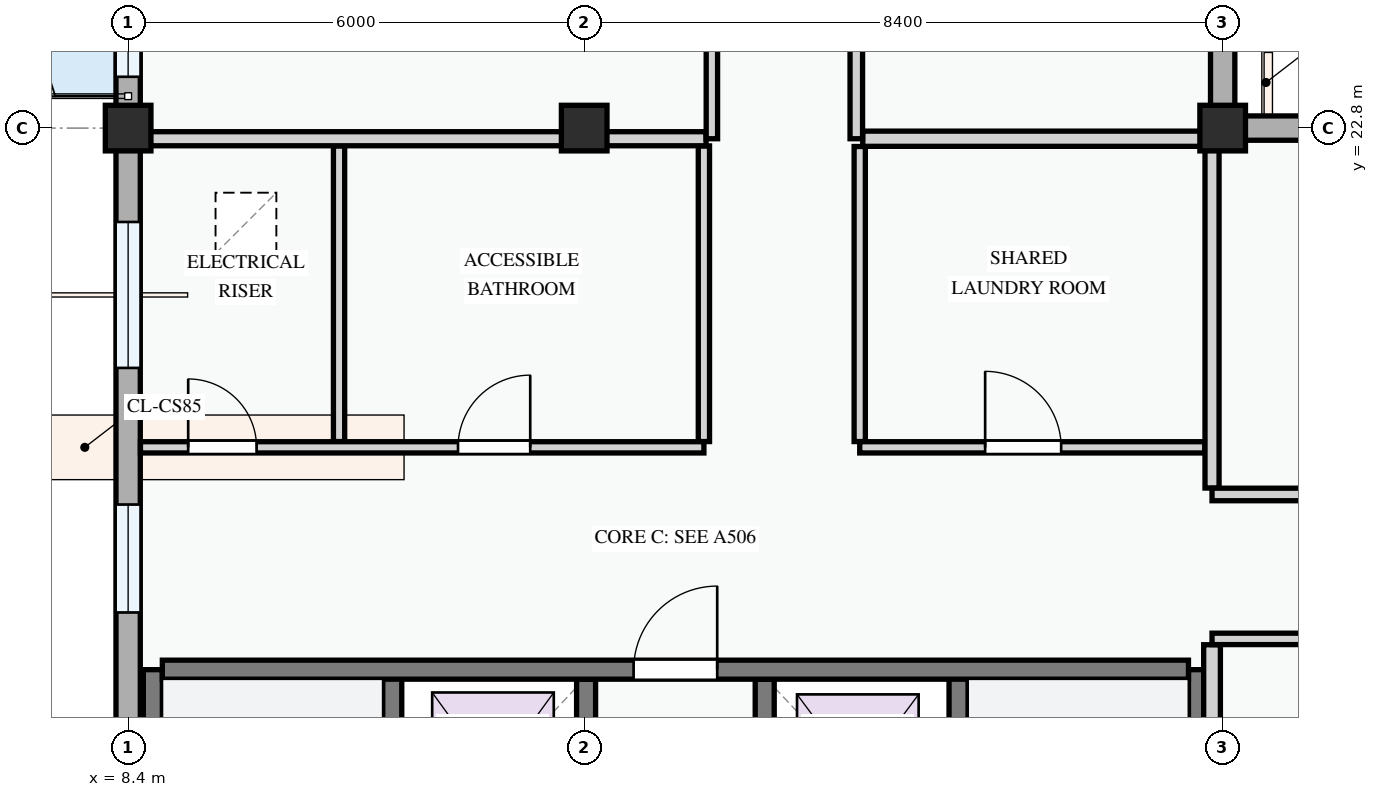
"""IFC4 building model, lengths in metres.
Left out: names, types, materials, properties, quantities, classifications, styles, units other than length and angle.
Written with IfcOpenShell. Run it as: python <this file> out.ifc"""

import sys

from ifc_helpers import new_model, si_unit, direction, frame, frame_2d, origin, origin_2d, place, context, subcontext, project, spatial, rectangle, extrude, element, fill, save


model = new_model("IFC4")
c1 = context("Model", 3, precision=1e-05, world=origin(), true_north=direction((0.0, 1.0)))
c2 = subcontext(c1, "Body", "Model", "MODEL_VIEW")
j1 = project(units=[si_unit("LENGTHUNIT", "METRE"), si_unit("PLANEANGLEUNIT", "RADIAN")], contexts=[c1])
p1 = place(None, origin())
s1 = spatial("IfcSite", under=j1, at=p1, CompositionType="ELEMENT")
p2 = place(p1, origin())
s2 = spatial("IfcBuilding", under=s1, at=p2, CompositionType="ELEMENT")
p3 = place(p2, frame((0.0, 0.0, 14.7)))
s3 = spatial("IfcBuildingStorey", under=s2, at=p3, CompositionType="ELEMENT", Elevation=14.7)
for number, where, z_axis, x_axis in (
    (1, (8.4, 22.8, 0.0), (0.0, 0.0, 1.0), (1.0, 0.0, 0.0)),
    (2, (14.4, 22.8, 0.0), (0.0, 0.0, 1.0), (1.0, 0.0, 0.0)),
    (3, (22.8, 22.8, 0.0), (0.0, 0.0, 1.0), (1.0, 0.0, 0.0)),
):
    element("IfcColumn", number, at=place(p3, frame(where, z_axis=z_axis, x_axis=x_axis)), inside=s3, PredefinedType="COLUMN", context=c2, shape_type="SweptSolid", body=[
        extrude(rectangle(XDim=0.6, YDim=0.6, at=origin_2d()), origin(), (0.0, 0.0, 1.0), 3.3),
    ])
p4 = place(p3, frame((22.8, 22.8, 0.0), z_axis=(0.0, 0.0, 1.0), x_axis=(0.0, 1.0, 0.0)))
e4 = element("IfcWall", 4, at=p4, inside=s3, PredefinedType="STANDARD", context=c2, shape_type="SweptSolid", body=[
    extrude(rectangle(XDim=6.0, YDim=0.32, at=frame_2d((3.0, 0.0))), origin(), (0.0, 0.0, 1.0), 2.575),
])
p5 = place(p4, frame((1.56, 0.0, 0.78)))
e5 = element("IfcOpeningElement", 5, at=p5, cuts=e4, PredefinedType="OPENING", context=c2, shape_type="SweptSolid", body=[
    extrude(rectangle(XDim=1.25, YDim=1.45, at=frame_2d((0.625, 0.725))), frame((0.0, 0.17, 0.0), z_axis=(0.0, -1.0, 0.0), x_axis=(1.0, 0.0, 0.0)), (0.0, 0.0, 1.0), 0.34),
])
p6 = place(p4, frame((4.521, 0.0, 0.78)))
e6 = element("IfcOpeningElement", 6, at=p6, cuts=e4, PredefinedType="OPENING", context=c2, shape_type="SweptSolid", body=[
    extrude(rectangle(XDim=0.95, YDim=1.15, at=frame_2d((0.475, 0.575))), frame((0.0, 0.17, 0.0), z_axis=(0.0, -1.0, 0.0), x_axis=(1.0, 0.0, 0.0)), (0.0, 0.0, 1.0), 0.34),
])
p7 = place(p3, frame((8.4, 28.8, 0.0), z_axis=(0.0, 0.0, 1.0), x_axis=(0.0, -1.0, 0.0)))
e7 = element("IfcWall", 7, at=p7, inside=s3, PredefinedType="STANDARD", context=c2, shape_type="SweptSolid", body=[
    extrude(rectangle(XDim=6.0, YDim=0.32, at=frame_2d((3.0, 0.0))), origin(), (0.0, 0.0, 1.0), 2.445),
])
p8 = place(p7, frame((2.14, 0.0, 0.0)))
e8 = element("IfcOpeningElement", 8, at=p8, cuts=e7, PredefinedType="OPENING", context=c2, shape_type="SweptSolid", body=[
    extrude(rectangle(XDim=1.4, YDim=2.2, at=frame_2d((0.7, 1.1))), frame((0.0, 0.17, 0.0), z_axis=(0.0, -1.0, 0.0), x_axis=(1.0, 0.0, 0.0)), (0.0, 0.0, 1.0), 0.34),
])
p9 = place(p7, frame((0.475, 0.0, 0.78)))
e9 = element("IfcOpeningElement", 9, at=p9, cuts=e7, PredefinedType="OPENING", context=c2, shape_type="SweptSolid", body=[
    extrude(rectangle(XDim=1.05, YDim=1.2, at=frame_2d((0.525, 0.6))), frame((0.0, 0.17, 0.0), z_axis=(0.0, -1.0, 0.0), x_axis=(1.0, 0.0, 0.0)), (0.0, 0.0, 1.0), 0.34),
])
p10 = place(p7, frame((4.075, 0.0, 0.78)))
e10 = element("IfcOpeningElement", 10, at=p10, cuts=e7, PredefinedType="OPENING", context=c2, shape_type="SweptSolid", body=[
    extrude(rectangle(XDim=1.25, YDim=1.3, at=frame_2d((0.625, 0.65))), frame((0.0, 0.17, 0.0), z_axis=(0.0, -1.0, 0.0), x_axis=(1.0, 0.0, 0.0)), (0.0, 0.0, 1.0), 0.34),
])
p11 = place(p3, frame((8.4, 22.8, 0.0), z_axis=(0.0, 0.0, 1.0), x_axis=(0.0, -1.0, 0.0)))
e11 = element("IfcWall", 11, at=p11, inside=s3, PredefinedType="STANDARD", context=c2, shape_type="SweptSolid", body=[
    extrude(rectangle(XDim=8.4, YDim=0.32, at=frame_2d((4.2, 0.0))), origin(), (0.0, 0.0, 1.0), 2.345),
])
p12 = place(p11, frame((1.235, 0.0, 0.78)))
e12 = element("IfcOpeningElement", 12, at=p12, cuts=e11, PredefinedType="OPENING", context=c2, shape_type="SweptSolid", body=[
    extrude(rectangle(XDim=1.92, YDim=1.44, at=frame_2d((0.96, 0.72))), frame((0.0, 0.17, 0.0), z_axis=(0.0, -1.0, 0.0), x_axis=(1.0, 0.0, 0.0)), (0.0, 0.0, 1.0), 0.34),
])
p13 = place(p11, frame((4.952, 0.0, 0.78)))
e13 = element("IfcOpeningElement", 13, at=p13, cuts=e11, PredefinedType="OPENING", context=c2, shape_type="SweptSolid", body=[
    extrude(rectangle(XDim=1.42, YDim=1.38, at=frame_2d((0.71, 0.69))), frame((0.0, 0.17, 0.0), z_axis=(0.0, -1.0, 0.0), x_axis=(1.0, 0.0, 0.0)), (0.0, 0.0, 1.0), 0.34),
])
p14 = place(p3, frame((28.8, 22.8, 0.0), z_axis=(0.0, 0.0, 1.0), x_axis=(-1.0, 0.0, 0.0)))
e14 = element("IfcWall", 14, at=p14, inside=s3, PredefinedType="STANDARD", context=c2, shape_type="SweptSolid", body=[
    extrude(rectangle(XDim=6.0, YDim=0.32, at=frame_2d((3.0, 0.0))), origin(), (0.0, 0.0, 1.0), 2.475),
])
p15 = place(p14, frame((0.555, 0.0, 0.78)))
e15 = element("IfcOpeningElement", 15, at=p15, cuts=e14, PredefinedType="OPENING", context=c2, shape_type="SweptSolid", body=[
    extrude(rectangle(XDim=0.9, YDim=1.2, at=frame_2d((0.45, 0.6))), frame((0.0, 0.17, 0.0), z_axis=(0.0, -1.0, 0.0), x_axis=(1.0, 0.0, 0.0)), (0.0, 0.0, 1.0), 0.34),
])
p16 = place(p14, frame((2.815, 0.0, 0.78)))
e16 = element("IfcOpeningElement", 16, at=p16, cuts=e14, PredefinedType="OPENING", context=c2, shape_type="SweptSolid", body=[
    extrude(rectangle(XDim=2.0, YDim=1.5, at=frame_2d((1.0, 0.75))), frame((0.0, 0.17, 0.0), z_axis=(0.0, -1.0, 0.0), x_axis=(1.0, 0.0, 0.0)), (0.0, 0.0, 1.0), 0.34),
])
p17 = place(p3, frame((11.875, 8.75, 0.0), z_axis=(0.0, 0.0, 1.0), x_axis=(0.0, 1.0, 0.0)))
e17 = element("IfcWall", 17, at=p17, inside=s3, PredefinedType="SHEAR", context=c2, shape_type="SweptSolid", body=[
    extrude(rectangle(XDim=6.925, YDim=0.25, at=frame_2d((3.462, 0.0))), origin(), (0.0, 0.0, 1.0), 3.0),
])
p18 = place(p17, frame((0.35, 0.0, 0.0)))
e18 = element("IfcOpeningElement", 18, at=p18, cuts=e17, PredefinedType="OPENING", context=c2, shape_type="SweptSolid", body=[
    extrude(rectangle(XDim=0.95, YDim=2.1, at=frame_2d((0.475, 1.05))), frame((0.0, 0.135, 0.0), z_axis=(0.0, -1.0, 0.0), x_axis=(1.0, 0.0, 0.0)), (0.0, 0.0, 1.0), 0.27),
])
p19 = place(p3, frame((8.725, 8.6, 0.0), z_axis=(0.0, 0.0, 1.0), x_axis=(0.0, 1.0, 0.0)))
e19 = element("IfcWall", 19, at=p19, inside=s3, PredefinedType="SHEAR", context=c2, shape_type="SweptSolid", body=[
    extrude(rectangle(XDim=7.075, YDim=0.25, at=frame_2d((3.538, 0.0))), origin(), (0.0, 0.0, 1.0), 3.0),
])
p20 = place(p3, frame((22.475, 8.75, 0.0), z_axis=(0.0, 0.0, 1.0), x_axis=(0.0, 1.0, 0.0)))
e20 = element("IfcWall", 20, at=p20, inside=s3, PredefinedType="SHEAR", context=c2, shape_type="SweptSolid", body=[
    extrude(rectangle(XDim=6.925, YDim=0.25, at=frame_2d((3.462, 0.0))), origin(), (0.0, 0.0, 1.0), 3.0),
])
p21 = place(p3, frame((19.325, 8.75, 0.0), z_axis=(0.0, 0.0, 1.0), x_axis=(0.0, 1.0, 0.0)))
e21 = element("IfcWall", 21, at=p21, inside=s3, PredefinedType="SHEAR", context=c2, shape_type="SweptSolid", body=[
    extrude(rectangle(XDim=6.925, YDim=0.25, at=frame_2d((3.462, 0.0))), origin(), (0.0, 0.0, 1.0), 3.0),
])
p22 = place(p21, frame((0.35, 0.0, 0.0)))
e22 = element("IfcOpeningElement", 22, at=p22, cuts=e21, PredefinedType="OPENING", context=c2, shape_type="SweptSolid", body=[
    extrude(rectangle(XDim=0.95, YDim=2.1, at=frame_2d((0.475, 1.05))), frame((0.0, 0.135, 0.0), z_axis=(0.0, -1.0, 0.0), x_axis=(1.0, 0.0, 0.0)), (0.0, 0.0, 1.0), 0.27),
])
for number, where, z_axis, x_axis in (
    (23, (14.425, 13.125, 0.0), (0.0, 0.0, 1.0), (0.0, 1.0, 0.0)),
    (24, (16.775, 13.125, 0.0), (0.0, 0.0, 1.0), (0.0, 1.0, 0.0)),
):
    element("IfcWall", number, at=place(p3, frame(where, z_axis=z_axis, x_axis=x_axis)), inside=s3, PredefinedType="SHEAR", context=c2, shape_type="SweptSolid", body=[
        extrude(rectangle(XDim=2.425, YDim=0.25, at=frame_2d((1.212, 0.0))), origin(), (0.0, 0.0, 1.0), 3.0),
    ])
p23 = place(p3, frame((8.85, 15.675, 0.0), z_axis=(0.0, 0.0, 1.0), x_axis=(1.0, 0.0, 0.0)))
e25 = element("IfcWall", 25, at=p23, inside=s3, PredefinedType="SHEAR", context=c2, shape_type="SweptSolid", body=[
    extrude(rectangle(XDim=13.5, YDim=0.25, at=frame_2d((6.75, 0.0))), origin(), (0.0, 0.0, 1.0), 3.0),
])
p24 = place(p23, frame((6.2, 0.0, 0.0)))
e26 = element("IfcOpeningElement", 26, at=p24, cuts=e25, PredefinedType="OPENING", context=c2, shape_type="SweptSolid", body=[
    extrude(rectangle(XDim=1.1, YDim=2.15, at=frame_2d((0.55, 1.075))), frame((0.0, 0.135, 0.0), z_axis=(0.0, -1.0, 0.0), x_axis=(1.0, 0.0, 0.0)), (0.0, 0.0, 1.0), 0.27),
])
for number, where, z_axis, x_axis in (
    (27, (11.175, 18.676, 0.0), (0.0, 0.0, 1.0), (0.0, 1.0, 0.0)),
    (28, (15.975, 18.676, 0.0), (0.0, 0.0, 1.0), (0.0, 1.0, 0.0)),
):
    element("IfcWall", number, at=place(p3, frame(where, z_axis=z_axis, x_axis=x_axis)), inside=s3, PredefinedType="PARTITIONING", context=c2, shape_type="SweptSolid", body=[
        extrude(rectangle(XDim=3.889, YDim=0.148, at=frame_2d((1.945, 0.0))), origin(), (0.0, 0.0, 1.0), 3.0),
    ])
p25 = place(p3, frame((18.025, 18.676, 0.0), z_axis=(0.0, 0.0, 1.0), x_axis=(0.0, 1.0, 0.0)))
e29 = element("IfcWall", 29, at=p25, inside=s3, PredefinedType="PARTITIONING", context=c2, shape_type="SweptSolid", body=[
    extrude(rectangle(XDim=3.882, YDim=0.148, at=frame_2d((1.941, 0.0))), origin(), (0.0, 0.0, 1.0), 3.0),
])
p26 = place(p3, frame((8.562, 18.6, 0.0), z_axis=(0.0, 0.0, 1.0), x_axis=(1.0, 0.0, 0.0)))
e30 = element("IfcWall", 30, at=p26, inside=s3, PredefinedType="PARTITIONING", context=c2, shape_type="SweptSolid", body=[
    extrude(rectangle(XDim=7.413, YDim=0.148, at=frame_2d((3.707, 0.0))), origin(), (0.0, 0.0, 1.0), 3.0),
])
p27 = place(p26, frame((0.628, 0.0, 0.0)))
e31 = element("IfcOpeningElement", 31, at=p27, cuts=e30, PredefinedType="OPENING", context=c2, shape_type="SweptSolid", body=[
    extrude(rectangle(XDim=0.9, YDim=2.1, at=frame_2d((0.45, 1.05))), frame((0.0, 0.084, 0.0), z_axis=(0.0, -1.0, 0.0), x_axis=(1.0, 0.0, 0.0)), (0.0, 0.0, 1.0), 0.168),
])
p28 = place(p26, frame((4.178, 0.0, 0.0)))
e32 = element("IfcOpeningElement", 32, at=p28, cuts=e30, PredefinedType="OPENING", context=c2, shape_type="SweptSolid", body=[
    extrude(rectangle(XDim=0.95, YDim=2.1, at=frame_2d((0.475, 1.05))), frame((0.0, 0.084, 0.0), z_axis=(0.0, -1.0, 0.0), x_axis=(1.0, 0.0, 0.0)), (0.0, 0.0, 1.0), 0.168),
])
p29 = place(p3, frame((18.025, 18.6, 0.0), z_axis=(0.0, 0.0, 1.0), x_axis=(1.0, 0.0, 0.0)))
e33 = element("IfcWall", 33, at=p29, inside=s3, PredefinedType="PARTITIONING", context=c2, shape_type="SweptSolid", body=[
    extrude(rectangle(XDim=4.541, YDim=0.148, at=frame_2d((2.27, 0.0))), origin(), (0.0, 0.0, 1.0), 3.0),
])
p30 = place(p29, frame((1.65, 0.0, 0.0)))
e34 = element("IfcOpeningElement", 34, at=p30, cuts=e33, PredefinedType="OPENING", context=c2, shape_type="SweptSolid", body=[
    extrude(rectangle(XDim=1.0, YDim=2.15, at=frame_2d((0.5, 1.075))), frame((0.0, 0.084, 0.0), z_axis=(0.0, -1.0, 0.0), x_axis=(1.0, 0.0, 0.0)), (0.0, 0.0, 1.0), 0.168),
])
p31 = place(p3, frame((8.562, 22.66, 0.0), z_axis=(0.0, 0.0, 1.0), x_axis=(1.0, 0.0, 0.0)))
e35 = element("IfcWall", 35, at=p31, inside=s3, PredefinedType="PARTITIONING", context=c2, shape_type="SweptSolid", body=[
    extrude(rectangle(XDim=7.441, YDim=0.185, at=frame_2d((3.72, 0.0))), origin(), (0.0, 0.0, 1.0), 2.375),
])
p32 = place(p3, frame((18.064, 22.66, 0.0), z_axis=(0.0, 0.0, 1.0), x_axis=(1.0, 0.0, 0.0)))
e36 = element("IfcWall", 36, at=p32, inside=s3, PredefinedType="PARTITIONING", context=c2, shape_type="SweptSolid", body=[
    extrude(rectangle(XDim=4.501, YDim=0.2, at=frame_2d((2.25, 0.0))), origin(), (0.0, 0.0, 1.0), 2.375),
])
p33 = place(p3, frame((16.08, 22.66, 0.0), z_axis=(0.0, 0.0, 1.0), x_axis=(0.0, 1.0, 0.0)))
e37 = element("IfcWall", 37, at=p33, inside=s3, PredefinedType="PARTITIONING", context=c2, shape_type="SweptSolid", body=[
    extrude(rectangle(XDim=34.778, YDim=0.15, at=frame_2d((17.389, 0.0))), origin(), (0.0, 0.0, 1.0), 3.0),
])
p34 = place(p33, frame((2.672, 0.0, 0.0)))
e38 = element("IfcOpeningElement", 38, at=p34, cuts=e37, PredefinedType="OPENING", context=c2, shape_type="SweptSolid", body=[
    extrude(rectangle(XDim=0.92, YDim=2.1, at=frame_2d((0.46, 1.05))), frame((0.0, 0.085, 0.0), z_axis=(0.0, -1.0, 0.0), x_axis=(1.0, 0.0, 0.0)), (0.0, 0.0, 1.0), 0.17),
])
p35 = place(p33, frame((10.71, 0.0, 0.0)))
e39 = element("IfcOpeningElement", 39, at=p35, cuts=e37, PredefinedType="OPENING", context=c2, shape_type="SweptSolid", body=[
    extrude(rectangle(XDim=0.92, YDim=2.1, at=frame_2d((0.46, 1.05))), frame((0.0, 0.085, 0.0), z_axis=(0.0, -1.0, 0.0), x_axis=(1.0, 0.0, 0.0)), (0.0, 0.0, 1.0), 0.17),
])
p36 = place(p33, frame((24.28, 0.0, 0.0)))
e40 = element("IfcOpeningElement", 40, at=p36, cuts=e37, PredefinedType="OPENING", context=c2, shape_type="SweptSolid", body=[
    extrude(rectangle(XDim=0.92, YDim=2.1, at=frame_2d((0.46, 1.05))), frame((0.0, 0.085, 0.0), z_axis=(0.0, -1.0, 0.0), x_axis=(1.0, 0.0, 0.0)), (0.0, 0.0, 1.0), 0.17),
])
p37 = place(p3, frame((17.98, 22.66, 0.0), z_axis=(0.0, 0.0, 1.0), x_axis=(0.0, 1.0, 0.0)))
e41 = element("IfcWall", 41, at=p37, inside=s3, PredefinedType="PARTITIONING", context=c2, shape_type="SweptSolid", body=[
    extrude(rectangle(XDim=34.778, YDim=0.165, at=frame_2d((17.389, 0.0))), origin(), (0.0, 0.0, 1.0), 3.0),
])
p38 = place(p37, frame((2.664, 0.0, 0.0)))
e42 = element("IfcOpeningElement", 42, at=p38, cuts=e41, PredefinedType="OPENING", context=c2, shape_type="SweptSolid", body=[
    extrude(rectangle(XDim=0.92, YDim=2.1, at=frame_2d((0.46, 1.05))), frame((0.0, 0.093, 0.0), z_axis=(0.0, -1.0, 0.0), x_axis=(1.0, 0.0, 0.0)), (0.0, 0.0, 1.0), 0.185),
])
p39 = place(p37, frame((10.71, 0.0, 0.0)))
e43 = element("IfcOpeningElement", 43, at=p39, cuts=e41, PredefinedType="OPENING", context=c2, shape_type="SweptSolid", body=[
    extrude(rectangle(XDim=0.96, YDim=2.12, at=frame_2d((0.48, 1.06))), frame((0.0, 0.093, 0.0), z_axis=(0.0, -1.0, 0.0), x_axis=(1.0, 0.0, 0.0)), (0.0, 0.0, 1.0), 0.185),
])
p40 = place(p37, frame((24.254, 0.0, 0.0)))
e44 = element("IfcOpeningElement", 44, at=p40, cuts=e41, PredefinedType="OPENING", context=c2, shape_type="SweptSolid", body=[
    extrude(rectangle(XDim=0.92, YDim=2.1, at=frame_2d((0.46, 1.05))), frame((0.0, 0.093, 0.0), z_axis=(0.0, -1.0, 0.0), x_axis=(1.0, 0.0, 0.0)), (0.0, 0.0, 1.0), 0.185),
])
p41 = place(p3, frame((22.66, 8.562, 0.0), z_axis=(0.0, 0.0, 1.0), x_axis=(0.0, 1.0, 0.0)))
e45 = element("IfcWall", 45, at=p41, inside=s3, PredefinedType="PARTITIONING", context=c2, shape_type="SweptSolid", body=[
    extrude(rectangle(XDim=7.441, YDim=0.22, at=frame_2d((3.72, 0.0))), origin(), (0.0, 0.0, 1.0), 2.425),
])
p42 = place(p3, frame((22.66, 18.064, 0.0), z_axis=(0.0, 0.0, 1.0), x_axis=(0.0, 1.0, 0.0)))
e46 = element("IfcWall", 46, at=p42, inside=s3, PredefinedType="PARTITIONING", context=c2, shape_type="SweptSolid", body=[
    extrude(rectangle(XDim=4.676, YDim=0.185, at=frame_2d((2.338, 0.0))), origin(), (0.0, 0.0, 1.0), 2.425),
])
p43 = place(p3, frame((22.66, 16.08, 0.0), z_axis=(0.0, 0.0, 1.0), x_axis=(1.0, 0.0, 0.0)))
e47 = element("IfcWall", 47, at=p43, inside=s3, PredefinedType="PARTITIONING", context=c2, shape_type="SweptSolid", body=[
    extrude(rectangle(XDim=34.778, YDim=0.15, at=frame_2d((17.389, 0.0))), origin(), (0.0, 0.0, 1.0), 3.0),
])
p44 = place(p43, frame((2.672, 0.0, 0.0)))
e48 = element("IfcOpeningElement", 48, at=p44, cuts=e47, PredefinedType="OPENING", context=c2, shape_type="SweptSolid", body=[
    extrude(rectangle(XDim=0.96, YDim=2.12, at=frame_2d((0.48, 1.06))), frame((0.0, 0.085, 0.0), z_axis=(0.0, -1.0, 0.0), x_axis=(1.0, 0.0, 0.0)), (0.0, 0.0, 1.0), 0.17),
])
p45 = place(p43, frame((10.71, 0.0, 0.0)))
e49 = element("IfcOpeningElement", 49, at=p45, cuts=e47, PredefinedType="OPENING", context=c2, shape_type="SweptSolid", body=[
    extrude(rectangle(XDim=0.92, YDim=2.1, at=frame_2d((0.46, 1.05))), frame((0.0, 0.085, 0.0), z_axis=(0.0, -1.0, 0.0), x_axis=(1.0, 0.0, 0.0)), (0.0, 0.0, 1.0), 0.17),
])
p46 = place(p43, frame((24.28, 0.0, 0.0)))
e50 = element("IfcOpeningElement", 50, at=p46, cuts=e47, PredefinedType="OPENING", context=c2, shape_type="SweptSolid", body=[
    extrude(rectangle(XDim=0.92, YDim=2.1, at=frame_2d((0.46, 1.05))), frame((0.0, 0.085, 0.0), z_axis=(0.0, -1.0, 0.0), x_axis=(1.0, 0.0, 0.0)), (0.0, 0.0, 1.0), 0.17),
])
p47 = place(p3, frame((22.66, 17.98, 0.0), z_axis=(0.0, 0.0, 1.0), x_axis=(1.0, 0.0, 0.0)))
e51 = element("IfcWall", 51, at=p47, inside=s3, PredefinedType="PARTITIONING", context=c2, shape_type="SweptSolid", body=[
    extrude(rectangle(XDim=34.778, YDim=0.165, at=frame_2d((17.389, 0.0))), origin(), (0.0, 0.0, 1.0), 3.0),
])
p48 = place(p47, frame((2.664, 0.0, 0.0)))
e52 = element("IfcOpeningElement", 52, at=p48, cuts=e51, PredefinedType="OPENING", context=c2, shape_type="SweptSolid", body=[
    extrude(rectangle(XDim=0.92, YDim=2.1, at=frame_2d((0.46, 1.05))), frame((0.0, 0.093, 0.0), z_axis=(0.0, -1.0, 0.0), x_axis=(1.0, 0.0, 0.0)), (0.0, 0.0, 1.0), 0.185),
])
p49 = place(p47, frame((10.71, 0.0, 0.0)))
e53 = element("IfcOpeningElement", 53, at=p49, cuts=e51, PredefinedType="OPENING", context=c2, shape_type="SweptSolid", body=[
    extrude(rectangle(XDim=0.92, YDim=2.1, at=frame_2d((0.46, 1.05))), frame((0.0, 0.093, 0.0), z_axis=(0.0, -1.0, 0.0), x_axis=(1.0, 0.0, 0.0)), (0.0, 0.0, 1.0), 0.185),
])
p50 = place(p47, frame((24.254, 0.0, 0.0)))
e54 = element("IfcOpeningElement", 54, at=p50, cuts=e51, PredefinedType="OPENING", context=c2, shape_type="SweptSolid", body=[
    extrude(rectangle(XDim=0.96, YDim=2.12, at=frame_2d((0.48, 1.06))), frame((0.0, 0.093, 0.0), z_axis=(0.0, -1.0, 0.0), x_axis=(1.0, 0.0, 0.0)), (0.0, 0.0, 1.0), 0.185),
])
p51 = place(p10, origin())
e55 = element("IfcWindow", 55, at=p51, inside=s3, PartitioningType="SINGLE_PANEL", PredefinedType="WINDOW", context=c2, shape_type="SweptSolid", body=[
    extrude(rectangle(XDim=1.25, YDim=1.3, at=frame_2d((0.625, 0.65))), frame((0.0, 0.03, 0.0), z_axis=(0.0, -1.0, 0.0), x_axis=(1.0, 0.0, 0.0)), (0.0, 0.0, 1.0), 0.06),
])
fill(e10, e55)
p52 = place(p12, origin())
e56 = element("IfcWindow", 56, at=p52, inside=s3, PartitioningType="DOUBLE_PANEL_VERTICAL", PredefinedType="WINDOW", context=c2, shape_type="SweptSolid", body=[
    extrude(rectangle(XDim=1.92, YDim=1.44, at=frame_2d((0.96, 0.72))), frame((0.0, 0.03, 0.0), z_axis=(0.0, -1.0, 0.0), x_axis=(1.0, 0.0, 0.0)), (0.0, 0.0, 1.0), 0.06),
])
fill(e12, e56)
p53 = place(p13, origin())
e57 = element("IfcWindow", 57, at=p53, inside=s3, PartitioningType="SINGLE_PANEL", PredefinedType="WINDOW", context=c2, shape_type="SweptSolid", body=[
    extrude(rectangle(XDim=1.42, YDim=1.38, at=frame_2d((0.71, 0.69))), frame((0.0, 0.03, 0.0), z_axis=(0.0, -1.0, 0.0), x_axis=(1.0, 0.0, 0.0)), (0.0, 0.0, 1.0), 0.06),
])
fill(e13, e57)
p54 = place(p24, origin())
e58 = element("IfcDoor", 58, at=p54, inside=s3, OperationType="SINGLE_SWING_RIGHT", PredefinedType="DOOR", context=c2, shape_type="SweptSolid", body=[
    extrude(rectangle(XDim=1.1, YDim=2.15, at=frame_2d((0.55, 1.075))), frame((0.0, 0.025, 0.0), z_axis=(0.0, -1.0, 0.0), x_axis=(1.0, 0.0, 0.0)), (0.0, 0.0, 1.0), 0.05),
])
fill(e26, e58)
p55 = place(p27, origin())
e59 = element("IfcDoor", 59, at=p55, inside=s3, OperationType="SINGLE_SWING_LEFT", PredefinedType="DOOR", context=c2, shape_type="SweptSolid", body=[
    extrude(rectangle(XDim=0.9, YDim=2.1, at=frame_2d((0.45, 1.05))), frame((0.0, 0.025, 0.0), z_axis=(0.0, -1.0, 0.0), x_axis=(1.0, 0.0, 0.0)), (0.0, 0.0, 1.0), 0.05),
])
fill(e31, e59)
p56 = place(p28, origin())
e60 = element("IfcDoor", 60, at=p56, inside=s3, OperationType="SINGLE_SWING_RIGHT", PredefinedType="DOOR", context=c2, shape_type="SweptSolid", body=[
    extrude(rectangle(XDim=0.95, YDim=2.1, at=frame_2d((0.475, 1.05))), frame((0.0, 0.025, 0.0), z_axis=(0.0, -1.0, 0.0), x_axis=(1.0, 0.0, 0.0)), (0.0, 0.0, 1.0), 0.05),
])
fill(e32, e60)
p57 = place(p30, origin())
e61 = element("IfcDoor", 61, at=p57, inside=s3, OperationType="SINGLE_SWING_LEFT", PredefinedType="DOOR", context=c2, shape_type="SweptSolid", body=[
    extrude(rectangle(XDim=1.0, YDim=2.15, at=frame_2d((0.5, 1.075))), frame((0.0, 0.025, 0.0), z_axis=(0.0, -1.0, 0.0), x_axis=(1.0, 0.0, 0.0)), (0.0, 0.0, 1.0), 0.05),
])
fill(e34, e61)
save(model, sys.argv[1])
